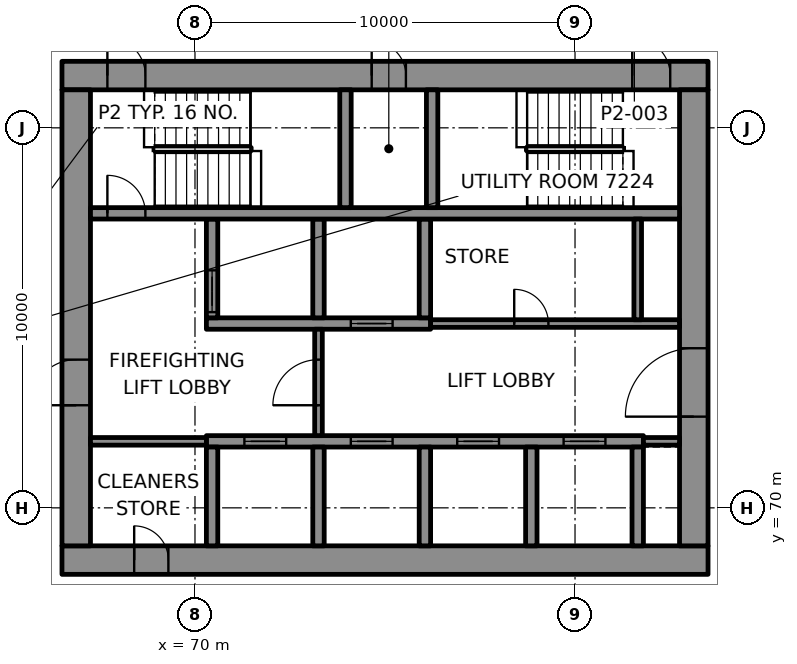
"""IFC4 building model, lengths in metres.
Left out: names, types, materials, properties, quantities, classifications, styles, units other than length and angle.
Written with IfcOpenShell. Run it as: python <this file> out.ifc"""

import sys

from ifc_helpers import new_model, si_unit, direction, frame, frame_2d, origin, place, context, subcontext, project, spatial, rectangle, extrude, element, fill, save


model = new_model("IFC4")
c1 = context("Model", 3, precision=1e-05, world=origin(), true_north=direction((0.0, 1.0)))
c2 = subcontext(c1, "Body", "Model", "MODEL_VIEW")
j1 = project(units=[si_unit("LENGTHUNIT", "METRE"), si_unit("PLANEANGLEUNIT", "RADIAN")], contexts=[c1])
p1 = place(None, origin())
s1 = spatial("IfcSite", under=j1, at=p1, CompositionType="ELEMENT")
p2 = place(p1, origin())
s2 = spatial("IfcBuilding", under=s1, at=p2, CompositionType="ELEMENT")
p3 = place(p2, frame((0.0, 0.0, 298.6)))
s3 = spatial("IfcBuildingStorey", under=s2, at=p3, CompositionType="ELEMENT", Elevation=298.6)
p4 = place(p3, frame((66.5, 68.625, 0.0), z_axis=(0.0, 0.0, 1.0), x_axis=(1.0, 0.0, 0.0)))
e1 = element("IfcWall", 1, at=p4, inside=s3, PredefinedType="SHEAR", context=c2, shape_type="SweptSolid", body=[
    extrude(rectangle(XDim=17.0, YDim=0.75, at=frame_2d((8.5, 0.0))), origin(), (0.0, 0.0, 1.0), 3.3),
])
p5 = place(p4, frame((1.9, 0.0, 0.0)))
e2 = element("IfcOpeningElement", 2, at=p5, cuts=e1, PredefinedType="OPENING", context=c2, shape_type="SweptSolid", body=[
    extrude(rectangle(XDim=0.9, YDim=2.1, at=frame_2d((0.45, 1.05))), frame((0.0, 0.385, 0.0), z_axis=(0.0, -1.0, 0.0), x_axis=(1.0, 0.0, 0.0)), (0.0, 0.0, 1.0), 0.77),
])
p6 = place(p3, frame((66.5, 81.375, 0.0), z_axis=(0.0, 0.0, 1.0), x_axis=(1.0, 0.0, 0.0)))
e3 = element("IfcWall", 3, at=p6, inside=s3, PredefinedType="SHEAR", context=c2, shape_type="SweptSolid", body=[
    extrude(rectangle(XDim=17.0, YDim=0.75, at=frame_2d((8.5, 0.0))), origin(), (0.0, 0.0, 1.0), 3.3),
])
p7 = place(p6, frame((1.195, 0.0, 0.0)))
e4 = element("IfcOpeningElement", 4, at=p7, cuts=e3, PredefinedType="OPENING", context=c2, shape_type="SweptSolid", body=[
    extrude(rectangle(XDim=1.0, YDim=2.1, at=frame_2d((0.5, 1.05))), frame((0.0, 0.385, 0.0), z_axis=(0.0, -1.0, 0.0), x_axis=(1.0, 0.0, 0.0)), (0.0, 0.0, 1.0), 0.77),
])
p8 = place(p6, frame((15.005, 0.0, 0.0)))
e5 = element("IfcOpeningElement", 5, at=p8, cuts=e3, PredefinedType="OPENING", context=c2, shape_type="SweptSolid", body=[
    extrude(rectangle(XDim=1.0, YDim=2.1, at=frame_2d((0.5, 1.05))), frame((0.0, 0.385, 0.0), z_axis=(0.0, -1.0, 0.0), x_axis=(1.0, 0.0, 0.0)), (0.0, 0.0, 1.0), 0.77),
])
p9 = place(p6, frame((8.15, 0.0, 0.0)))
e6 = element("IfcOpeningElement", 6, at=p9, cuts=e3, PredefinedType="OPENING", context=c2, shape_type="SweptSolid", body=[
    extrude(rectangle(XDim=0.9, YDim=2.1, at=frame_2d((0.45, 1.05))), frame((0.0, 0.385, 0.0), z_axis=(0.0, -1.0, 0.0), x_axis=(1.0, 0.0, 0.0)), (0.0, 0.0, 1.0), 0.77),
])
p10 = place(p3, frame((66.875, 69.0, 0.0), z_axis=(0.0, 0.0, 1.0), x_axis=(0.0, 1.0, 0.0)))
e7 = element("IfcWall", 7, at=p10, inside=s3, PredefinedType="SHEAR", context=c2, shape_type="SweptSolid", body=[
    extrude(rectangle(XDim=12.0, YDim=0.75, at=frame_2d((6.0, 0.0))), origin(), (0.0, 0.0, 1.0), 3.3),
])
p11 = place(p10, frame((3.7, 0.0, 0.0)))
e8 = element("IfcOpeningElement", 8, at=p11, cuts=e7, PredefinedType="OPENING", context=c2, shape_type="SweptSolid", body=[
    extrude(rectangle(XDim=1.2, YDim=2.1, at=frame_2d((0.6, 1.05))), frame((0.0, 0.385, 0.0), z_axis=(0.0, -1.0, 0.0), x_axis=(1.0, 0.0, 0.0)), (0.0, 0.0, 1.0), 0.77),
])
p12 = place(p3, frame((83.125, 69.0, 0.0), z_axis=(0.0, 0.0, 1.0), x_axis=(0.0, 1.0, 0.0)))
e9 = element("IfcWall", 9, at=p12, inside=s3, PredefinedType="SHEAR", context=c2, shape_type="SweptSolid", body=[
    extrude(rectangle(XDim=12.0, YDim=0.75, at=frame_2d((6.0, 0.0))), origin(), (0.0, 0.0, 1.0), 3.3),
])
p13 = place(p12, frame((3.4, 0.0, 0.0)))
e10 = element("IfcOpeningElement", 10, at=p13, cuts=e9, PredefinedType="OPENING", context=c2, shape_type="SweptSolid", body=[
    extrude(rectangle(XDim=1.8, YDim=2.1, at=frame_2d((0.9, 1.05))), frame((0.0, 0.385, 0.0), z_axis=(0.0, -1.0, 0.0), x_axis=(1.0, 0.0, 0.0)), (0.0, 0.0, 1.0), 0.77),
])
p14 = place(p3, frame((70.3, 71.75, 0.0), z_axis=(0.0, 0.0, 1.0), x_axis=(1.0, 0.0, 0.0)))
e11 = element("IfcWall", 11, at=p14, inside=s3, PredefinedType="SHEAR", context=c2, shape_type="SweptSolid", body=[
    extrude(rectangle(XDim=11.5, YDim=0.3, at=frame_2d((5.75, 0.0))), origin(), (0.0, 0.0, 1.0), 3.3),
])
p15 = place(p14, frame((1.0, 0.0, 0.0)))
e12 = element("IfcOpeningElement", 12, at=p15, cuts=e11, PredefinedType="OPENING", context=c2, shape_type="SweptSolid", body=[
    extrude(rectangle(XDim=1.1, YDim=2.1, at=frame_2d((0.55, 1.05))), frame((0.0, 0.16, 0.0), z_axis=(0.0, -1.0, 0.0), x_axis=(1.0, 0.0, 0.0)), (0.0, 0.0, 1.0), 0.32),
])
p16 = place(p14, frame((3.8, 0.0, 0.0)))
e13 = element("IfcOpeningElement", 13, at=p16, cuts=e11, PredefinedType="OPENING", context=c2, shape_type="SweptSolid", body=[
    extrude(rectangle(XDim=1.1, YDim=2.1, at=frame_2d((0.55, 1.05))), frame((0.0, 0.16, 0.0), z_axis=(0.0, -1.0, 0.0), x_axis=(1.0, 0.0, 0.0)), (0.0, 0.0, 1.0), 0.32),
])
p17 = place(p14, frame((6.6, 0.0, 0.0)))
e14 = element("IfcOpeningElement", 14, at=p17, cuts=e11, PredefinedType="OPENING", context=c2, shape_type="SweptSolid", body=[
    extrude(rectangle(XDim=1.1, YDim=2.1, at=frame_2d((0.55, 1.05))), frame((0.0, 0.16, 0.0), z_axis=(0.0, -1.0, 0.0), x_axis=(1.0, 0.0, 0.0)), (0.0, 0.0, 1.0), 0.32),
])
p18 = place(p14, frame((9.4, 0.0, 0.0)))
e15 = element("IfcOpeningElement", 15, at=p18, cuts=e11, PredefinedType="OPENING", context=c2, shape_type="SweptSolid", body=[
    extrude(rectangle(XDim=1.1, YDim=2.1, at=frame_2d((0.55, 1.05))), frame((0.0, 0.16, 0.0), z_axis=(0.0, -1.0, 0.0), x_axis=(1.0, 0.0, 0.0)), (0.0, 0.0, 1.0), 0.32),
])
p19 = place(p3, frame((70.3, 74.85, 0.0), z_axis=(0.0, 0.0, 1.0), x_axis=(1.0, 0.0, 0.0)))
e16 = element("IfcWall", 16, at=p19, inside=s3, PredefinedType="SHEAR", context=c2, shape_type="SweptSolid", body=[
    extrude(rectangle(XDim=5.9, YDim=0.3, at=frame_2d((2.95, 0.0))), origin(), (0.0, 0.0, 1.0), 3.3),
])
p20 = place(p19, frame((3.8, 0.0, 0.0)))
e17 = element("IfcOpeningElement", 17, at=p20, cuts=e16, PredefinedType="OPENING", context=c2, shape_type="SweptSolid", body=[
    extrude(rectangle(XDim=1.1, YDim=2.1, at=frame_2d((0.55, 1.05))), frame((0.0, 0.16, 0.0), z_axis=(0.0, -1.0, 0.0), x_axis=(1.0, 0.0, 0.0)), (0.0, 0.0, 1.0), 0.32),
])
p21 = place(p3, frame((70.45, 69.0, 0.0), z_axis=(0.0, 0.0, 1.0), x_axis=(0.0, 1.0, 0.0)))
e18 = element("IfcWall", 18, at=p21, inside=s3, PredefinedType="SHEAR", context=c2, shape_type="SweptSolid", body=[
    extrude(rectangle(XDim=2.6, YDim=0.3, at=frame_2d((1.3, 0.0))), origin(), (0.0, 0.0, 1.0), 3.3),
])
p22 = place(p3, frame((70.45, 75.0, 0.0), z_axis=(0.0, 0.0, 1.0), x_axis=(0.0, 1.0, 0.0)))
e19 = element("IfcWall", 19, at=p22, inside=s3, PredefinedType="SHEAR", context=c2, shape_type="SweptSolid", body=[
    extrude(rectangle(XDim=2.6, YDim=0.3, at=frame_2d((1.3, 0.0))), origin(), (0.0, 0.0, 1.0), 3.3),
])
p23 = place(p22, frame((0.15, 0.0, 0.0)))
e20 = element("IfcOpeningElement", 20, at=p23, cuts=e19, PredefinedType="OPENING", context=c2, shape_type="SweptSolid", body=[
    extrude(rectangle(XDim=1.1, YDim=2.1, at=frame_2d((0.55, 1.05))), frame((0.0, 0.16, 0.0), z_axis=(0.0, -1.0, 0.0), x_axis=(1.0, 0.0, 0.0)), (0.0, 0.0, 1.0), 0.32),
])
for number, where, z_axis, x_axis in (
    (21, (73.25, 69.0, 0.0), (0.0, 0.0, 1.0), (0.0, 1.0, 0.0)),
    (22, (73.25, 75.0, 0.0), (0.0, 0.0, 1.0), (0.0, 1.0, 0.0)),
    (23, (76.05, 69.0, 0.0), (0.0, 0.0, 1.0), (0.0, 1.0, 0.0)),
    (24, (76.05, 75.0, 0.0), (0.0, 0.0, 1.0), (0.0, 1.0, 0.0)),
    (25, (78.85, 69.0, 0.0), (0.0, 0.0, 1.0), (0.0, 1.0, 0.0)),
    (26, (81.65, 69.0, 0.0), (0.0, 0.0, 1.0), (0.0, 1.0, 0.0)),
):
    element("IfcWall", number, at=place(p3, frame(where, z_axis=z_axis, x_axis=x_axis)), inside=s3, PredefinedType="SHEAR", context=c2, shape_type="SweptSolid", body=[
        extrude(rectangle(XDim=2.6, YDim=0.3, at=frame_2d((1.3, 0.0))), origin(), (0.0, 0.0, 1.0), 3.3),
    ])
p24 = place(p3, frame((67.25, 77.75, 0.0), z_axis=(0.0, 0.0, 1.0), x_axis=(1.0, 0.0, 0.0)))
e27 = element("IfcWall", 27, at=p24, inside=s3, PredefinedType="SHEAR", context=c2, shape_type="SweptSolid", body=[
    extrude(rectangle(XDim=15.5, YDim=0.3, at=frame_2d((7.75, 0.0))), origin(), (0.0, 0.0, 1.0), 3.3),
])
p25 = place(p24, frame((0.445, 0.0, 0.0)))
e28 = element("IfcOpeningElement", 28, at=p25, cuts=e27, PredefinedType="OPENING", context=c2, shape_type="SweptSolid", body=[
    extrude(rectangle(XDim=1.0, YDim=2.1, at=frame_2d((0.5, 1.05))), frame((0.0, 0.16, 0.0), z_axis=(0.0, -1.0, 0.0), x_axis=(1.0, 0.0, 0.0)), (0.0, 0.0, 1.0), 0.32),
])
for number, where, z_axis, x_axis in (
    (29, (73.96, 77.9, 0.0), (0.0, 0.0, 1.0), (0.0, 1.0, 0.0)),
    (30, (76.24, 77.9, 0.0), (0.0, 0.0, 1.0), (0.0, 1.0, 0.0)),
):
    element("IfcWall", number, at=place(p3, frame(where, z_axis=z_axis, x_axis=x_axis)), inside=s3, PredefinedType="SHEAR", context=c2, shape_type="SweptSolid", body=[
        extrude(rectangle(XDim=3.1, YDim=0.3, at=frame_2d((1.55, 0.0))), origin(), (0.0, 0.0, 1.0), 3.3),
    ])
p26 = place(p3, frame((67.25, 71.75, 0.0), z_axis=(0.0, 0.0, 1.0), x_axis=(1.0, 0.0, 0.0)))
e31 = element("IfcWall", 31, at=p26, inside=s3, PredefinedType="PARTITIONING", context=c2, shape_type="SweptSolid", body=[
    extrude(rectangle(XDim=3.05, YDim=0.2, at=frame_2d((1.525, 0.0))), origin(), (0.0, 0.0, 1.0), 3.3),
])
p27 = place(p3, frame((81.8, 71.75, 0.0), z_axis=(0.0, 0.0, 1.0), x_axis=(1.0, 0.0, 0.0)))
e32 = element("IfcWall", 32, at=p27, inside=s3, PredefinedType="PARTITIONING", context=c2, shape_type="SweptSolid", body=[
    extrude(rectangle(XDim=0.95, YDim=0.2, at=frame_2d((0.475, 0.0))), origin(), (0.0, 0.0, 1.0), 3.3),
])
p28 = place(p3, frame((76.2, 74.85, 0.0), z_axis=(0.0, 0.0, 1.0), x_axis=(1.0, 0.0, 0.0)))
e33 = element("IfcWall", 33, at=p28, inside=s3, PredefinedType="PARTITIONING", context=c2, shape_type="SweptSolid", body=[
    extrude(rectangle(XDim=6.55, YDim=0.2, at=frame_2d((3.275, 0.0))), origin(), (0.0, 0.0, 1.0), 3.3),
])
p29 = place(p28, frame((2.2, 0.0, 0.0)))
e34 = element("IfcOpeningElement", 34, at=p29, cuts=e33, PredefinedType="OPENING", context=c2, shape_type="SweptSolid", body=[
    extrude(rectangle(XDim=0.9, YDim=2.1, at=frame_2d((0.45, 1.05))), frame((0.0, 0.11, 0.0), z_axis=(0.0, -1.0, 0.0), x_axis=(1.0, 0.0, 0.0)), (0.0, 0.0, 1.0), 0.22),
])
p30 = place(p3, frame((73.25, 71.9, 0.0), z_axis=(0.0, 0.0, 1.0), x_axis=(0.0, 1.0, 0.0)))
e35 = element("IfcWall", 35, at=p30, inside=s3, PredefinedType="PARTITIONING", context=c2, shape_type="SweptSolid", body=[
    extrude(rectangle(XDim=2.8, YDim=0.2, at=frame_2d((1.4, 0.0))), origin(), (0.0, 0.0, 1.0), 3.3),
])
p31 = place(p30, frame((0.8, 0.0, 0.0)))
e36 = element("IfcOpeningElement", 36, at=p31, cuts=e35, PredefinedType="OPENING", context=c2, shape_type="SweptSolid", body=[
    extrude(rectangle(XDim=1.2, YDim=2.1, at=frame_2d((0.6, 1.05))), frame((0.0, 0.11, 0.0), z_axis=(0.0, -1.0, 0.0), x_axis=(1.0, 0.0, 0.0)), (0.0, 0.0, 1.0), 0.22),
])
p32 = place(p3, frame((81.65, 74.95, 0.0), z_axis=(0.0, 0.0, 1.0), x_axis=(0.0, 1.0, 0.0)))
e37 = element("IfcWall", 37, at=p32, inside=s3, PredefinedType="PARTITIONING", context=c2, shape_type="SweptSolid", body=[
    extrude(rectangle(XDim=2.65, YDim=0.2, at=frame_2d((1.325, 0.0))), origin(), (0.0, 0.0, 1.0), 3.3),
])
p33 = place(p15, origin())
e38 = element("IfcDoor", 38, at=p33, inside=s3, OperationType="DOUBLE_DOOR_SLIDING", PredefinedType="DOOR", context=c2, shape_type="SweptSolid", body=[
    extrude(rectangle(XDim=1.1, YDim=2.1, at=frame_2d((0.55, 1.05))), frame((0.0, 0.025, 0.0), z_axis=(0.0, -1.0, 0.0), x_axis=(1.0, 0.0, 0.0)), (0.0, 0.0, 1.0), 0.05),
])
fill(e12, e38)
p34 = place(p16, origin())
e39 = element("IfcDoor", 39, at=p34, inside=s3, OperationType="DOUBLE_DOOR_SLIDING", PredefinedType="DOOR", context=c2, shape_type="SweptSolid", body=[
    extrude(rectangle(XDim=1.1, YDim=2.1, at=frame_2d((0.55, 1.05))), frame((0.0, 0.025, 0.0), z_axis=(0.0, -1.0, 0.0), x_axis=(1.0, 0.0, 0.0)), (0.0, 0.0, 1.0), 0.05),
])
fill(e13, e39)
p35 = place(p17, origin())
e40 = element("IfcDoor", 40, at=p35, inside=s3, OperationType="DOUBLE_DOOR_SLIDING", PredefinedType="DOOR", context=c2, shape_type="SweptSolid", body=[
    extrude(rectangle(XDim=1.1, YDim=2.1, at=frame_2d((0.55, 1.05))), frame((0.0, 0.025, 0.0), z_axis=(0.0, -1.0, 0.0), x_axis=(1.0, 0.0, 0.0)), (0.0, 0.0, 1.0), 0.05),
])
fill(e14, e40)
p36 = place(p18, origin())
e41 = element("IfcDoor", 41, at=p36, inside=s3, OperationType="DOUBLE_DOOR_SLIDING", PredefinedType="DOOR", context=c2, shape_type="SweptSolid", body=[
    extrude(rectangle(XDim=1.1, YDim=2.1, at=frame_2d((0.55, 1.05))), frame((0.0, 0.025, 0.0), z_axis=(0.0, -1.0, 0.0), x_axis=(1.0, 0.0, 0.0)), (0.0, 0.0, 1.0), 0.05),
])
fill(e15, e41)
p37 = place(p23, origin())
e42 = element("IfcDoor", 42, at=p37, inside=s3, OperationType="DOUBLE_DOOR_SLIDING", PredefinedType="DOOR", context=c2, shape_type="SweptSolid", body=[
    extrude(rectangle(XDim=1.1, YDim=2.1, at=frame_2d((0.55, 1.05))), frame((0.0, 0.025, 0.0), z_axis=(0.0, -1.0, 0.0), x_axis=(1.0, 0.0, 0.0)), (0.0, 0.0, 1.0), 0.05),
])
fill(e20, e42)
p38 = place(p20, origin())
e43 = element("IfcDoor", 43, at=p38, inside=s3, OperationType="DOUBLE_DOOR_SLIDING", PredefinedType="DOOR", context=c2, shape_type="SweptSolid", body=[
    extrude(rectangle(XDim=1.1, YDim=2.1, at=frame_2d((0.55, 1.05))), frame((0.0, 0.025, 0.0), z_axis=(0.0, -1.0, 0.0), x_axis=(1.0, 0.0, 0.0)), (0.0, 0.0, 1.0), 0.05),
])
fill(e17, e43)
p39 = place(p25, origin())
e44 = element("IfcDoor", 44, at=p39, inside=s3, OperationType="SINGLE_SWING_LEFT", PredefinedType="DOOR", context=c2, shape_type="SweptSolid", body=[
    extrude(rectangle(XDim=1.0, YDim=2.1, at=frame_2d((0.5, 1.05))), frame((0.0, 0.025, 0.0), z_axis=(0.0, -1.0, 0.0), x_axis=(1.0, 0.0, 0.0)), (0.0, 0.0, 1.0), 0.05),
])
fill(e28, e44)
p40 = place(p7, origin())
e45 = element("IfcDoor", 45, at=p40, inside=s3, OperationType="SINGLE_SWING_RIGHT", PredefinedType="DOOR", context=c2, shape_type="SweptSolid", body=[
    extrude(rectangle(XDim=1.0, YDim=2.1, at=frame_2d((0.5, 1.05))), frame((0.0, 0.095, 0.0), z_axis=(0.0, -1.0, 0.0), x_axis=(1.0, 0.0, 0.0)), (0.0, 0.0, 1.0), 0.19),
])
fill(e4, e45)
p41 = place(p8, origin())
e46 = element("IfcDoor", 46, at=p41, inside=s3, OperationType="SINGLE_SWING_LEFT", PredefinedType="DOOR", context=c2, shape_type="SweptSolid", body=[
    extrude(rectangle(XDim=1.0, YDim=2.1, at=frame_2d((0.5, 1.05))), frame((0.0, 0.095, 0.0), z_axis=(0.0, -1.0, 0.0), x_axis=(1.0, 0.0, 0.0)), (0.0, 0.0, 1.0), 0.19),
])
fill(e5, e46)
p42 = place(p31, origin())
e47 = element("IfcDoor", 47, at=p42, inside=s3, OperationType="SINGLE_SWING_LEFT", PredefinedType="DOOR", context=c2, shape_type="SweptSolid", body=[
    extrude(rectangle(XDim=1.2, YDim=2.1, at=frame_2d((0.6, 1.05))), frame((0.0, 0.025, 0.0), z_axis=(0.0, -1.0, 0.0), x_axis=(1.0, 0.0, 0.0)), (0.0, 0.0, 1.0), 0.05),
])
fill(e36, e47)
p43 = place(p11, origin())
e48 = element("IfcDoor", 48, at=p43, inside=s3, OperationType="SINGLE_SWING_RIGHT", PredefinedType="DOOR", context=c2, shape_type="SweptSolid", body=[
    extrude(rectangle(XDim=1.2, YDim=2.1, at=frame_2d((0.6, 1.05))), frame((0.0, 0.095, 0.0), z_axis=(0.0, -1.0, 0.0), x_axis=(1.0, 0.0, 0.0)), (0.0, 0.0, 1.0), 0.19),
])
fill(e8, e48)
p44 = place(p13, origin())
e49 = element("IfcDoor", 49, at=p44, inside=s3, OperationType="SINGLE_SWING_LEFT", PredefinedType="DOOR", context=c2, shape_type="SweptSolid", body=[
    extrude(rectangle(XDim=1.8, YDim=2.1, at=frame_2d((0.9, 1.05))), frame((0.0, 0.095, 0.0), z_axis=(0.0, -1.0, 0.0), x_axis=(1.0, 0.0, 0.0)), (0.0, 0.0, 1.0), 0.19),
])
fill(e10, e49)
p45 = place(p5, origin())
e50 = element("IfcDoor", 50, at=p45, inside=s3, OperationType="SINGLE_SWING_RIGHT", PredefinedType="DOOR", context=c2, shape_type="SweptSolid", body=[
    extrude(rectangle(XDim=0.9, YDim=2.1, at=frame_2d((0.45, 1.05))), frame((0.0, 0.095, 0.0), z_axis=(0.0, -1.0, 0.0), x_axis=(1.0, 0.0, 0.0)), (0.0, 0.0, 1.0), 0.19),
])
fill(e2, e50)
p46 = place(p29, origin())
e51 = element("IfcDoor", 51, at=p46, inside=s3, OperationType="SINGLE_SWING_LEFT", PredefinedType="DOOR", context=c2, shape_type="SweptSolid", body=[
    extrude(rectangle(XDim=0.9, YDim=2.1, at=frame_2d((0.45, 1.05))), frame((0.0, 0.025, 0.0), z_axis=(0.0, -1.0, 0.0), x_axis=(1.0, 0.0, 0.0)), (0.0, 0.0, 1.0), 0.05),
])
fill(e34, e51)
p47 = place(p9, origin())
e52 = element("IfcDoor", 52, at=p47, inside=s3, OperationType="SINGLE_SWING_RIGHT", PredefinedType="DOOR", context=c2, shape_type="SweptSolid", body=[
    extrude(rectangle(XDim=0.9, YDim=2.1, at=frame_2d((0.45, 1.05))), frame((0.0, 0.095, 0.0), z_axis=(0.0, -1.0, 0.0), x_axis=(1.0, 0.0, 0.0)), (0.0, 0.0, 1.0), 0.19),
])
fill(e6, e52)
save(model, sys.argv[1])
